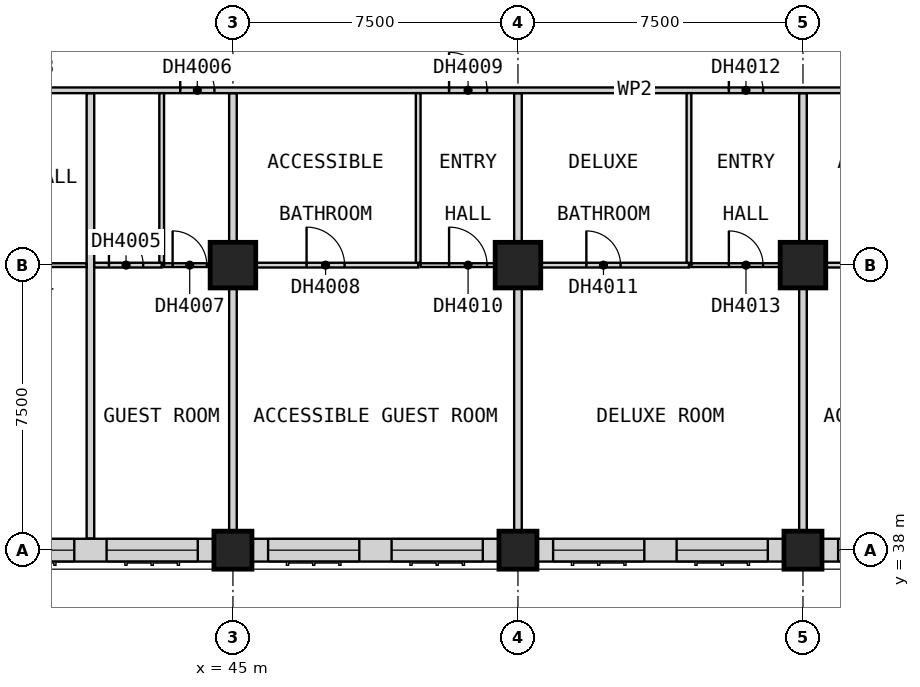
"""IFC4 building model, lengths in metres.
Left out: names, types, materials, properties, quantities, classifications, styles, units other than length and angle.
Written with IfcOpenShell. Run it as: python <this file> out.ifc"""

import sys

from ifc_helpers import new_model, si_unit, direction, frame, frame_2d, origin, origin_2d, place, context, subcontext, project, spatial, rectangle, extrude, element, fill, save


model = new_model("IFC4")
c1 = context("Model", 3, precision=1e-05, world=origin(), true_north=direction((0.0, 1.0)))
c2 = subcontext(c1, "Body", "Model", "MODEL_VIEW")
j1 = project(units=[si_unit("LENGTHUNIT", "METRE"), si_unit("PLANEANGLEUNIT", "RADIAN")], contexts=[c1])
p1 = place(None, origin())
s1 = spatial("IfcSite", under=j1, at=p1, CompositionType="ELEMENT")
p2 = place(p1, origin())
s2 = spatial("IfcBuilding", under=s1, at=p2, CompositionType="ELEMENT")
p3 = place(p2, frame((0.0, 0.0, 44.8)))
s3 = spatial("IfcBuildingStorey", under=s2, at=p3, CompositionType="ELEMENT", Elevation=44.8)
p4 = place(p3, frame((45.0, 38.0, 0.0), z_axis=(0.0, 0.0, 1.0), x_axis=(1.0, 0.0, 0.0)))
e1 = element("IfcColumn", 1, at=p4, inside=s3, PredefinedType="COLUMN", context=c2, shape_type="SweptSolid", body=[
    extrude(rectangle(XDim=1.0, YDim=1.0, at=origin_2d()), origin(), (0.0, 0.0, 1.0), 3.6),
])
p5 = place(p3, frame((45.0, 45.5, 0.0), z_axis=(0.0, 0.0, 1.0), x_axis=(1.0, 0.0, 0.0)))
e2 = element("IfcColumn", 2, at=p5, inside=s3, PredefinedType="COLUMN", context=c2, shape_type="SweptSolid", body=[
    extrude(rectangle(XDim=1.2, YDim=1.2, at=origin_2d()), origin(), (0.0, 0.0, 1.0), 3.6),
])
p6 = place(p3, frame((52.5, 38.0, 0.0), z_axis=(0.0, 0.0, 1.0), x_axis=(1.0, 0.0, 0.0)))
e3 = element("IfcColumn", 3, at=p6, inside=s3, PredefinedType="COLUMN", context=c2, shape_type="SweptSolid", body=[
    extrude(rectangle(XDim=1.0, YDim=1.0, at=origin_2d()), origin(), (0.0, 0.0, 1.0), 3.6),
])
p7 = place(p3, frame((52.5, 45.5, 0.0), z_axis=(0.0, 0.0, 1.0), x_axis=(1.0, 0.0, 0.0)))
e4 = element("IfcColumn", 4, at=p7, inside=s3, PredefinedType="COLUMN", context=c2, shape_type="SweptSolid", body=[
    extrude(rectangle(XDim=1.2, YDim=1.2, at=origin_2d()), origin(), (0.0, 0.0, 1.0), 3.6),
])
p8 = place(p3, frame((60.0, 38.0, 0.0), z_axis=(0.0, 0.0, 1.0), x_axis=(1.0, 0.0, 0.0)))
e5 = element("IfcColumn", 5, at=p8, inside=s3, PredefinedType="COLUMN", context=c2, shape_type="SweptSolid", body=[
    extrude(rectangle(XDim=1.0, YDim=1.0, at=origin_2d()), origin(), (0.0, 0.0, 1.0), 3.6),
])
p9 = place(p3, frame((60.0, 45.5, 0.0), z_axis=(0.0, 0.0, 1.0), x_axis=(1.0, 0.0, 0.0)))
e6 = element("IfcColumn", 6, at=p9, inside=s3, PredefinedType="COLUMN", context=c2, shape_type="SweptSolid", body=[
    extrude(rectangle(XDim=1.2, YDim=1.2, at=origin_2d()), origin(), (0.0, 0.0, 1.0), 3.6),
])
p10 = place(p3, frame((38.0, 38.0, 0.0), z_axis=(0.0, 0.0, 1.0), x_axis=(1.0, 0.0, 0.0)))
e7 = element("IfcWall", 7, at=p10, inside=s3, PredefinedType="SOLIDWALL", context=c2, shape_type="SweptSolid", body=[
    extrude(rectangle(XDim=6.5, YDim=0.6, at=frame_2d((3.25, 0.0))), origin(), (0.0, 0.0, 1.0), 2.85),
])
p11 = place(p10, frame((0.425, 0.0, 0.8)))
e8 = element("IfcOpeningElement", 8, at=p11, cuts=e7, PredefinedType="OPENING", context=c2, shape_type="SweptSolid", body=[
    extrude(rectangle(XDim=2.4, YDim=1.8, at=frame_2d((1.2, 0.9))), frame((0.0, 0.31, 0.0), z_axis=(0.0, -1.0, 0.0), x_axis=(1.0, 0.0, 0.0)), (0.0, 0.0, 1.0), 0.62),
])
p12 = place(p10, frame((3.675, 0.0, 0.8)))
e9 = element("IfcOpeningElement", 9, at=p12, cuts=e7, PredefinedType="OPENING", context=c2, shape_type="SweptSolid", body=[
    extrude(rectangle(XDim=2.4, YDim=1.8, at=frame_2d((1.2, 0.9))), frame((0.0, 0.31, 0.0), z_axis=(0.0, -1.0, 0.0), x_axis=(1.0, 0.0, 0.0)), (0.0, 0.0, 1.0), 0.62),
])
p13 = place(p3, frame((45.5, 38.0, 0.0), z_axis=(0.0, 0.0, 1.0), x_axis=(1.0, 0.0, 0.0)))
e10 = element("IfcWall", 10, at=p13, inside=s3, PredefinedType="SOLIDWALL", context=c2, shape_type="SweptSolid", body=[
    extrude(rectangle(XDim=6.5, YDim=0.6, at=frame_2d((3.25, 0.0))), origin(), (0.0, 0.0, 1.0), 2.85),
])
p14 = place(p13, frame((0.425, 0.0, 0.8)))
e11 = element("IfcOpeningElement", 11, at=p14, cuts=e10, PredefinedType="OPENING", context=c2, shape_type="SweptSolid", body=[
    extrude(rectangle(XDim=2.4, YDim=1.8, at=frame_2d((1.2, 0.9))), frame((0.0, 0.31, 0.0), z_axis=(0.0, -1.0, 0.0), x_axis=(1.0, 0.0, 0.0)), (0.0, 0.0, 1.0), 0.62),
])
p15 = place(p13, frame((3.675, 0.0, 0.8)))
e12 = element("IfcOpeningElement", 12, at=p15, cuts=e10, PredefinedType="OPENING", context=c2, shape_type="SweptSolid", body=[
    extrude(rectangle(XDim=2.4, YDim=1.8, at=frame_2d((1.2, 0.9))), frame((0.0, 0.31, 0.0), z_axis=(0.0, -1.0, 0.0), x_axis=(1.0, 0.0, 0.0)), (0.0, 0.0, 1.0), 0.62),
])
p16 = place(p3, frame((53.0, 38.0, 0.0), z_axis=(0.0, 0.0, 1.0), x_axis=(1.0, 0.0, 0.0)))
e13 = element("IfcWall", 13, at=p16, inside=s3, PredefinedType="SOLIDWALL", context=c2, shape_type="SweptSolid", body=[
    extrude(rectangle(XDim=6.5, YDim=0.6, at=frame_2d((3.25, 0.0))), origin(), (0.0, 0.0, 1.0), 2.85),
])
p17 = place(p16, frame((0.425, 0.0, 0.8)))
e14 = element("IfcOpeningElement", 14, at=p17, cuts=e13, PredefinedType="OPENING", context=c2, shape_type="SweptSolid", body=[
    extrude(rectangle(XDim=2.4, YDim=1.8, at=frame_2d((1.2, 0.9))), frame((0.0, 0.31, 0.0), z_axis=(0.0, -1.0, 0.0), x_axis=(1.0, 0.0, 0.0)), (0.0, 0.0, 1.0), 0.62),
])
p18 = place(p16, frame((3.675, 0.0, 0.8)))
e15 = element("IfcOpeningElement", 15, at=p18, cuts=e13, PredefinedType="OPENING", context=c2, shape_type="SweptSolid", body=[
    extrude(rectangle(XDim=2.4, YDim=1.8, at=frame_2d((1.2, 0.9))), frame((0.0, 0.31, 0.0), z_axis=(0.0, -1.0, 0.0), x_axis=(1.0, 0.0, 0.0)), (0.0, 0.0, 1.0), 0.62),
])
p19 = place(p3, frame((60.5, 38.0, 0.0), z_axis=(0.0, 0.0, 1.0), x_axis=(1.0, 0.0, 0.0)))
e16 = element("IfcWall", 16, at=p19, inside=s3, PredefinedType="SOLIDWALL", context=c2, shape_type="SweptSolid", body=[
    extrude(rectangle(XDim=6.5, YDim=0.6, at=frame_2d((3.25, 0.0))), origin(), (0.0, 0.0, 1.0), 2.85),
])
p20 = place(p19, frame((0.425, 0.0, 0.8)))
e17 = element("IfcOpeningElement", 17, at=p20, cuts=e16, PredefinedType="OPENING", context=c2, shape_type="SweptSolid", body=[
    extrude(rectangle(XDim=2.4, YDim=1.8, at=frame_2d((1.2, 0.9))), frame((0.0, 0.31, 0.0), z_axis=(0.0, -1.0, 0.0), x_axis=(1.0, 0.0, 0.0)), (0.0, 0.0, 1.0), 0.62),
])
p21 = place(p19, frame((3.675, 0.0, 0.8)))
e18 = element("IfcOpeningElement", 18, at=p21, cuts=e16, PredefinedType="OPENING", context=c2, shape_type="SweptSolid", body=[
    extrude(rectangle(XDim=2.4, YDim=1.8, at=frame_2d((1.2, 0.9))), frame((0.0, 0.31, 0.0), z_axis=(0.0, -1.0, 0.0), x_axis=(1.0, 0.0, 0.0)), (0.0, 0.0, 1.0), 0.62),
])
p22 = place(p3, frame((41.25, 38.31, 0.0), z_axis=(0.0, 0.0, 1.0), x_axis=(0.0, 1.0, 0.0)))
e19 = element("IfcWall", 19, at=p22, inside=s3, PredefinedType="PARTITIONING", context=c2, shape_type="SweptSolid", body=[
    extrude(rectangle(XDim=11.715, YDim=0.2, at=frame_2d((5.857, 0.0))), origin(), (0.0, 0.0, 1.0), 3.35),
])
for number, where, z_axis, x_axis in (
    (20, (45.0, 37.5, 0.0), (0.0, 0.0, 1.0), (0.0, 1.0, 0.0)),
    (21, (52.5, 37.5, 0.0), (0.0, 0.0, 1.0), (0.0, 1.0, 0.0)),
    (22, (60.0, 37.5, 0.0), (0.0, 0.0, 1.0), (0.0, 1.0, 0.0)),
):
    element("IfcWall", number, at=place(p3, frame(where, z_axis=z_axis, x_axis=x_axis)), inside=s3, PredefinedType="PARTITIONING", context=c2, shape_type="SweptSolid", body=[
        extrude(rectangle(XDim=12.525, YDim=0.2, at=frame_2d((6.262, 0.0))), origin(), (0.0, 0.0, 1.0), 3.35),
    ])
p23 = place(p3, frame((33.75, 50.1, 0.0), z_axis=(0.0, 0.0, 1.0), x_axis=(1.0, 0.0, 0.0)))
e23 = element("IfcWall", 23, at=p23, inside=s3, PredefinedType="PARTITIONING", context=c2, shape_type="SweptSolid", body=[
    extrude(rectangle(XDim=43.65, YDim=0.15, at=frame_2d((21.825, 0.0))), origin(), (0.0, 0.0, 1.0), 3.35),
])
p24 = place(p23, frame((5.175, 0.0, 0.0)))
e24 = element("IfcOpeningElement", 24, at=p24, cuts=e23, PredefinedType="OPENING", context=c2, shape_type="SweptSolid", body=[
    extrude(rectangle(XDim=0.9, YDim=2.1, at=frame_2d((0.45, 1.05))), frame((0.0, 0.085, 0.0), z_axis=(0.0, -1.0, 0.0), x_axis=(1.0, 0.0, 0.0)), (0.0, 0.0, 1.0), 0.17),
])
p25 = place(p23, frame((9.863, 0.0, 0.0)))
e25 = element("IfcOpeningElement", 25, at=p25, cuts=e23, PredefinedType="OPENING", context=c2, shape_type="SweptSolid", body=[
    extrude(rectangle(XDim=0.9, YDim=2.1, at=frame_2d((0.45, 1.05))), frame((0.0, 0.085, 0.0), z_axis=(0.0, -1.0, 0.0), x_axis=(1.0, 0.0, 0.0)), (0.0, 0.0, 1.0), 0.17),
])
p26 = place(p23, frame((16.938, 0.0, 0.0)))
e26 = element("IfcOpeningElement", 26, at=p26, cuts=e23, PredefinedType="OPENING", context=c2, shape_type="SweptSolid", body=[
    extrude(rectangle(XDim=1.0, YDim=2.1, at=frame_2d((0.5, 1.05))), frame((0.0, 0.085, 0.0), z_axis=(0.0, -1.0, 0.0), x_axis=(1.0, 0.0, 0.0)), (0.0, 0.0, 1.0), 0.17),
])
p27 = place(p23, frame((24.3, 0.0, 0.0)))
e27 = element("IfcOpeningElement", 27, at=p27, cuts=e23, PredefinedType="OPENING", context=c2, shape_type="SweptSolid", body=[
    extrude(rectangle(XDim=0.9, YDim=2.1, at=frame_2d((0.45, 1.05))), frame((0.0, 0.085, 0.0), z_axis=(0.0, -1.0, 0.0), x_axis=(1.0, 0.0, 0.0)), (0.0, 0.0, 1.0), 0.17),
])
p28 = place(p23, frame((31.938, 0.0, 0.0)))
e28 = element("IfcOpeningElement", 28, at=p28, cuts=e23, PredefinedType="OPENING", context=c2, shape_type="SweptSolid", body=[
    extrude(rectangle(XDim=1.0, YDim=2.1, at=frame_2d((0.5, 1.05))), frame((0.0, 0.085, 0.0), z_axis=(0.0, -1.0, 0.0), x_axis=(1.0, 0.0, 0.0)), (0.0, 0.0, 1.0), 0.17),
])
p29 = place(p23, frame((39.3, 0.0, 0.0)))
e29 = element("IfcOpeningElement", 29, at=p29, cuts=e23, PredefinedType="OPENING", context=c2, shape_type="SweptSolid", body=[
    extrude(rectangle(XDim=0.9, YDim=2.1, at=frame_2d((0.45, 1.05))), frame((0.0, 0.085, 0.0), z_axis=(0.0, -1.0, 0.0), x_axis=(1.0, 0.0, 0.0)), (0.0, 0.0, 1.0), 0.17),
])
p30 = place(p23, frame((42.0, 0.0, 0.0)))
e30 = element("IfcOpeningElement", 30, at=p30, cuts=e23, PredefinedType="OPENING", context=c2, shape_type="SweptSolid", body=[
    extrude(rectangle(XDim=0.9, YDim=2.1, at=frame_2d((0.45, 1.05))), frame((0.0, 0.085, 0.0), z_axis=(0.0, -1.0, 0.0), x_axis=(1.0, 0.0, 0.0)), (0.0, 0.0, 1.0), 0.17),
])
p31 = place(p3, frame((33.812, 45.5, 0.0), z_axis=(0.0, 0.0, 1.0), x_axis=(1.0, 0.0, 0.0)))
e31 = element("IfcWall", 31, at=p31, inside=s3, PredefinedType="PARTITIONING", context=c2, shape_type="SweptSolid", body=[
    extrude(rectangle(XDim=7.337, YDim=0.1, at=frame_2d((3.669, 0.0))), origin(), (0.0, 0.0, 1.0), 3.35),
])
p32 = place(p31, frame((5.113, 0.0, 0.0)))
e32 = element("IfcOpeningElement", 32, at=p32, cuts=e31, PredefinedType="OPENING", context=c2, shape_type="SweptSolid", body=[
    extrude(rectangle(XDim=0.9, YDim=2.1, at=frame_2d((0.45, 1.05))), frame((0.0, 0.06, 0.0), z_axis=(0.0, -1.0, 0.0), x_axis=(1.0, 0.0, 0.0)), (0.0, 0.0, 1.0), 0.12),
])
p33 = place(p3, frame((43.188, 45.5, 0.0), z_axis=(0.0, 0.0, 1.0), x_axis=(1.0, 0.0, 0.0)))
e33 = element("IfcWall", 33, at=p33, inside=s3, PredefinedType="PARTITIONING", context=c2, shape_type="SweptSolid", body=[
    extrude(rectangle(XDim=1.712, YDim=0.1, at=frame_2d((0.856, 0.0))), origin(), (0.0, 0.0, 1.0), 3.35),
])
p34 = place(p33, frame((0.225, 0.0, 0.0)))
e34 = element("IfcOpeningElement", 34, at=p34, cuts=e33, PredefinedType="OPENING", context=c2, shape_type="SweptSolid", body=[
    extrude(rectangle(XDim=0.9, YDim=2.1, at=frame_2d((0.45, 1.05))), frame((0.0, 0.06, 0.0), z_axis=(0.0, -1.0, 0.0), x_axis=(1.0, 0.0, 0.0)), (0.0, 0.0, 1.0), 0.12),
])
p35 = place(p3, frame((49.938, 45.5, 0.0), z_axis=(0.0, 0.0, 1.0), x_axis=(1.0, 0.0, 0.0)))
e35 = element("IfcWall", 35, at=p35, inside=s3, PredefinedType="PARTITIONING", context=c2, shape_type="SweptSolid", body=[
    extrude(rectangle(XDim=2.462, YDim=0.1, at=frame_2d((1.231, 0.0))), origin(), (0.0, 0.0, 1.0), 3.35),
])
p36 = place(p35, frame((0.75, 0.0, 0.0)))
e36 = element("IfcOpeningElement", 36, at=p36, cuts=e35, PredefinedType="OPENING", context=c2, shape_type="SweptSolid", body=[
    extrude(rectangle(XDim=1.0, YDim=2.1, at=frame_2d((0.5, 1.05))), frame((0.0, 0.06, 0.0), z_axis=(0.0, -1.0, 0.0), x_axis=(1.0, 0.0, 0.0)), (0.0, 0.0, 1.0), 0.12),
])
p37 = place(p3, frame((57.062, 45.5, 0.0), z_axis=(0.0, 0.0, 1.0), x_axis=(1.0, 0.0, 0.0)))
e37 = element("IfcWall", 37, at=p37, inside=s3, PredefinedType="PARTITIONING", context=c2, shape_type="SweptSolid", body=[
    extrude(rectangle(XDim=2.837, YDim=0.1, at=frame_2d((1.419, 0.0))), origin(), (0.0, 0.0, 1.0), 3.35),
])
p38 = place(p37, frame((0.988, 0.0, 0.0)))
e38 = element("IfcOpeningElement", 38, at=p38, cuts=e37, PredefinedType="OPENING", context=c2, shape_type="SweptSolid", body=[
    extrude(rectangle(XDim=0.9, YDim=2.1, at=frame_2d((0.45, 1.05))), frame((0.0, 0.06, 0.0), z_axis=(0.0, -1.0, 0.0), x_axis=(1.0, 0.0, 0.0)), (0.0, 0.0, 1.0), 0.12),
])
p39 = place(p3, frame((41.35, 45.5, 0.0), z_axis=(0.0, 0.0, 1.0), x_axis=(1.0, 0.0, 0.0)))
e39 = element("IfcWall", 39, at=p39, inside=s3, PredefinedType="PARTITIONING", context=c2, shape_type="SweptSolid", body=[
    extrude(rectangle(XDim=1.775, YDim=0.125, at=frame_2d((0.887, 0.0))), origin(), (0.0, 0.0, 1.0), 3.35),
])
p40 = place(p39, frame((0.387, 0.0, 0.0)))
e40 = element("IfcOpeningElement", 40, at=p40, cuts=e39, PredefinedType="OPENING", context=c2, shape_type="SweptSolid", body=[
    extrude(rectangle(XDim=0.9, YDim=2.1, at=frame_2d((0.45, 1.05))), frame((0.0, 0.073, 0.0), z_axis=(0.0, -1.0, 0.0), x_axis=(1.0, 0.0, 0.0)), (0.0, 0.0, 1.0), 0.145),
])
p41 = place(p3, frame((45.1, 45.5, 0.0), z_axis=(0.0, 0.0, 1.0), x_axis=(1.0, 0.0, 0.0)))
e41 = element("IfcWall", 41, at=p41, inside=s3, PredefinedType="PARTITIONING", context=c2, shape_type="SweptSolid", body=[
    extrude(rectangle(XDim=4.775, YDim=0.125, at=frame_2d((2.387, 0.0))), origin(), (0.0, 0.0, 1.0), 3.35),
])
p42 = place(p41, frame((1.837, 0.0, 0.0)))
e42 = element("IfcOpeningElement", 42, at=p42, cuts=e41, PredefinedType="OPENING", context=c2, shape_type="SweptSolid", body=[
    extrude(rectangle(XDim=1.0, YDim=2.1, at=frame_2d((0.5, 1.05))), frame((0.0, 0.073, 0.0), z_axis=(0.0, -1.0, 0.0), x_axis=(1.0, 0.0, 0.0)), (0.0, 0.0, 1.0), 0.145),
])
p43 = place(p3, frame((52.6, 45.5, 0.0), z_axis=(0.0, 0.0, 1.0), x_axis=(1.0, 0.0, 0.0)))
e43 = element("IfcWall", 43, at=p43, inside=s3, PredefinedType="PARTITIONING", context=c2, shape_type="SweptSolid", body=[
    extrude(rectangle(XDim=4.4, YDim=0.125, at=frame_2d((2.2, 0.0))), origin(), (0.0, 0.0, 1.0), 3.35),
])
p44 = place(p43, frame((1.7, 0.0, 0.0)))
e44 = element("IfcOpeningElement", 44, at=p44, cuts=e43, PredefinedType="OPENING", context=c2, shape_type="SweptSolid", body=[
    extrude(rectangle(XDim=0.9, YDim=2.1, at=frame_2d((0.45, 1.05))), frame((0.0, 0.073, 0.0), z_axis=(0.0, -1.0, 0.0), x_axis=(1.0, 0.0, 0.0)), (0.0, 0.0, 1.0), 0.145),
])
p45 = place(p3, frame((60.1, 45.5, 0.0), z_axis=(0.0, 0.0, 1.0), x_axis=(1.0, 0.0, 0.0)))
e45 = element("IfcWall", 45, at=p45, inside=s3, PredefinedType="PARTITIONING", context=c2, shape_type="SweptSolid", body=[
    extrude(rectangle(XDim=4.775, YDim=0.125, at=frame_2d((2.387, 0.0))), origin(), (0.0, 0.0, 1.0), 3.35),
])
p46 = place(p45, frame((1.837, 0.0, 0.0)))
e46 = element("IfcOpeningElement", 46, at=p46, cuts=e45, PredefinedType="OPENING", context=c2, shape_type="SweptSolid", body=[
    extrude(rectangle(XDim=1.0, YDim=2.1, at=frame_2d((0.5, 1.05))), frame((0.0, 0.073, 0.0), z_axis=(0.0, -1.0, 0.0), x_axis=(1.0, 0.0, 0.0)), (0.0, 0.0, 1.0), 0.145),
])
for number, where, z_axis, x_axis in (
    (47, (43.125, 45.562, 0.0), (0.0, 0.0, 1.0), (0.0, 1.0, 0.0)),
    (48, (49.875, 45.562, 0.0), (0.0, 0.0, 1.0), (0.0, 1.0, 0.0)),
    (49, (57.0, 45.562, 0.0), (0.0, 0.0, 1.0), (0.0, 1.0, 0.0)),
):
    element("IfcWall", number, at=place(p3, frame(where, z_axis=z_axis, x_axis=x_axis)), inside=s3, PredefinedType="PARTITIONING", context=c2, shape_type="SweptSolid", body=[
        extrude(rectangle(XDim=4.462, YDim=0.125, at=frame_2d((2.231, 0.0))), origin(), (0.0, 0.0, 1.0), 3.35),
    ])
p47 = place(p11, origin())
e50 = element("IfcWindow", 50, at=p47, inside=s3, PartitioningType="SINGLE_PANEL", PredefinedType="WINDOW", context=c2, shape_type="SweptSolid", body=[
    extrude(rectangle(XDim=2.4, YDim=1.8, at=frame_2d((1.2, 0.9))), frame((0.0, -0.07, 0.0), z_axis=(0.0, -1.0, 0.0), x_axis=(1.0, 0.0, 0.0)), (0.0, 0.0, 1.0), 0.06),
])
fill(e8, e50)
p48 = place(p12, origin())
e51 = element("IfcWindow", 51, at=p48, inside=s3, PartitioningType="SINGLE_PANEL", PredefinedType="WINDOW", context=c2, shape_type="SweptSolid", body=[
    extrude(rectangle(XDim=2.4, YDim=1.8, at=frame_2d((1.2, 0.9))), frame((0.0, -0.07, 0.0), z_axis=(0.0, -1.0, 0.0), x_axis=(1.0, 0.0, 0.0)), (0.0, 0.0, 1.0), 0.06),
])
fill(e9, e51)
p49 = place(p14, origin())
e52 = element("IfcWindow", 52, at=p49, inside=s3, PartitioningType="SINGLE_PANEL", PredefinedType="WINDOW", context=c2, shape_type="SweptSolid", body=[
    extrude(rectangle(XDim=2.4, YDim=1.8, at=frame_2d((1.2, 0.9))), frame((0.0, -0.07, 0.0), z_axis=(0.0, -1.0, 0.0), x_axis=(1.0, 0.0, 0.0)), (0.0, 0.0, 1.0), 0.06),
])
fill(e11, e52)
p50 = place(p15, origin())
e53 = element("IfcWindow", 53, at=p50, inside=s3, PartitioningType="SINGLE_PANEL", PredefinedType="WINDOW", context=c2, shape_type="SweptSolid", body=[
    extrude(rectangle(XDim=2.4, YDim=1.8, at=frame_2d((1.2, 0.9))), frame((0.0, -0.07, 0.0), z_axis=(0.0, -1.0, 0.0), x_axis=(1.0, 0.0, 0.0)), (0.0, 0.0, 1.0), 0.06),
])
fill(e12, e53)
p51 = place(p17, origin())
e54 = element("IfcWindow", 54, at=p51, inside=s3, PartitioningType="SINGLE_PANEL", PredefinedType="WINDOW", context=c2, shape_type="SweptSolid", body=[
    extrude(rectangle(XDim=2.4, YDim=1.8, at=frame_2d((1.2, 0.9))), frame((0.0, -0.07, 0.0), z_axis=(0.0, -1.0, 0.0), x_axis=(1.0, 0.0, 0.0)), (0.0, 0.0, 1.0), 0.06),
])
fill(e14, e54)
p52 = place(p18, origin())
e55 = element("IfcWindow", 55, at=p52, inside=s3, PartitioningType="SINGLE_PANEL", PredefinedType="WINDOW", context=c2, shape_type="SweptSolid", body=[
    extrude(rectangle(XDim=2.4, YDim=1.8, at=frame_2d((1.2, 0.9))), frame((0.0, -0.07, 0.0), z_axis=(0.0, -1.0, 0.0), x_axis=(1.0, 0.0, 0.0)), (0.0, 0.0, 1.0), 0.06),
])
fill(e15, e55)
p53 = place(p20, origin())
e56 = element("IfcWindow", 56, at=p53, inside=s3, PartitioningType="SINGLE_PANEL", PredefinedType="WINDOW", context=c2, shape_type="SweptSolid", body=[
    extrude(rectangle(XDim=2.4, YDim=1.8, at=frame_2d((1.2, 0.9))), frame((0.0, -0.07, 0.0), z_axis=(0.0, -1.0, 0.0), x_axis=(1.0, 0.0, 0.0)), (0.0, 0.0, 1.0), 0.06),
])
fill(e17, e56)
p54 = place(p40, origin())
e57 = element("IfcDoor", 57, at=p54, inside=s3, OperationType="SINGLE_SWING_LEFT", PredefinedType="DOOR", context=c2, shape_type="SweptSolid", body=[
    extrude(rectangle(XDim=0.9, YDim=2.1, at=frame_2d((0.45, 1.05))), frame((0.0, 0.025, 0.0), z_axis=(0.0, -1.0, 0.0), x_axis=(1.0, 0.0, 0.0)), (0.0, 0.0, 1.0), 0.05),
])
fill(e40, e57)
p55 = place(p25, origin())
e58 = element("IfcDoor", 58, at=p55, inside=s3, OperationType="SINGLE_SWING_RIGHT", PredefinedType="DOOR", context=c2, shape_type="SweptSolid", body=[
    extrude(rectangle(XDim=0.9, YDim=2.1, at=frame_2d((0.45, 1.05))), frame((0.0, 0.025, 0.0), z_axis=(0.0, -1.0, 0.0), x_axis=(1.0, 0.0, 0.0)), (0.0, 0.0, 1.0), 0.05),
])
fill(e25, e58)
p56 = place(p34, origin())
e59 = element("IfcDoor", 59, at=p56, inside=s3, OperationType="SINGLE_SWING_LEFT", PredefinedType="DOOR", context=c2, shape_type="SweptSolid", body=[
    extrude(rectangle(XDim=0.9, YDim=2.1, at=frame_2d((0.45, 1.05))), frame((0.0, 0.025, 0.0), z_axis=(0.0, -1.0, 0.0), x_axis=(1.0, 0.0, 0.0)), (0.0, 0.0, 1.0), 0.05),
])
fill(e34, e59)
p57 = place(p42, origin())
e60 = element("IfcDoor", 60, at=p57, inside=s3, OperationType="SINGLE_SWING_LEFT", PredefinedType="DOOR", context=c2, shape_type="SweptSolid", body=[
    extrude(rectangle(XDim=1.0, YDim=2.1, at=frame_2d((0.5, 1.05))), frame((0.0, 0.025, 0.0), z_axis=(0.0, -1.0, 0.0), x_axis=(1.0, 0.0, 0.0)), (0.0, 0.0, 1.0), 0.05),
])
fill(e42, e60)
p58 = place(p26, origin())
e61 = element("IfcDoor", 61, at=p58, inside=s3, OperationType="SINGLE_SWING_RIGHT", PredefinedType="DOOR", context=c2, shape_type="SweptSolid", body=[
    extrude(rectangle(XDim=1.0, YDim=2.1, at=frame_2d((0.5, 1.05))), frame((0.0, 0.025, 0.0), z_axis=(0.0, -1.0, 0.0), x_axis=(1.0, 0.0, 0.0)), (0.0, 0.0, 1.0), 0.05),
])
fill(e26, e61)
p59 = place(p36, origin())
e62 = element("IfcDoor", 62, at=p59, inside=s3, OperationType="SINGLE_SWING_LEFT", PredefinedType="DOOR", context=c2, shape_type="SweptSolid", body=[
    extrude(rectangle(XDim=1.0, YDim=2.1, at=frame_2d((0.5, 1.05))), frame((0.0, 0.025, 0.0), z_axis=(0.0, -1.0, 0.0), x_axis=(1.0, 0.0, 0.0)), (0.0, 0.0, 1.0), 0.05),
])
fill(e36, e62)
p60 = place(p44, origin())
e63 = element("IfcDoor", 63, at=p60, inside=s3, OperationType="SINGLE_SWING_LEFT", PredefinedType="DOOR", context=c2, shape_type="SweptSolid", body=[
    extrude(rectangle(XDim=0.9, YDim=2.1, at=frame_2d((0.45, 1.05))), frame((0.0, 0.025, 0.0), z_axis=(0.0, -1.0, 0.0), x_axis=(1.0, 0.0, 0.0)), (0.0, 0.0, 1.0), 0.05),
])
fill(e44, e63)
p61 = place(p27, origin())
e64 = element("IfcDoor", 64, at=p61, inside=s3, OperationType="SINGLE_SWING_RIGHT", PredefinedType="DOOR", context=c2, shape_type="SweptSolid", body=[
    extrude(rectangle(XDim=0.9, YDim=2.1, at=frame_2d((0.45, 1.05))), frame((0.0, 0.025, 0.0), z_axis=(0.0, -1.0, 0.0), x_axis=(1.0, 0.0, 0.0)), (0.0, 0.0, 1.0), 0.05),
])
fill(e27, e64)
p62 = place(p38, origin())
e65 = element("IfcDoor", 65, at=p62, inside=s3, OperationType="SINGLE_SWING_LEFT", PredefinedType="DOOR", context=c2, shape_type="SweptSolid", body=[
    extrude(rectangle(XDim=0.9, YDim=2.1, at=frame_2d((0.45, 1.05))), frame((0.0, 0.025, 0.0), z_axis=(0.0, -1.0, 0.0), x_axis=(1.0, 0.0, 0.0)), (0.0, 0.0, 1.0), 0.05),
])
fill(e38, e65)
save(model, sys.argv[1])
